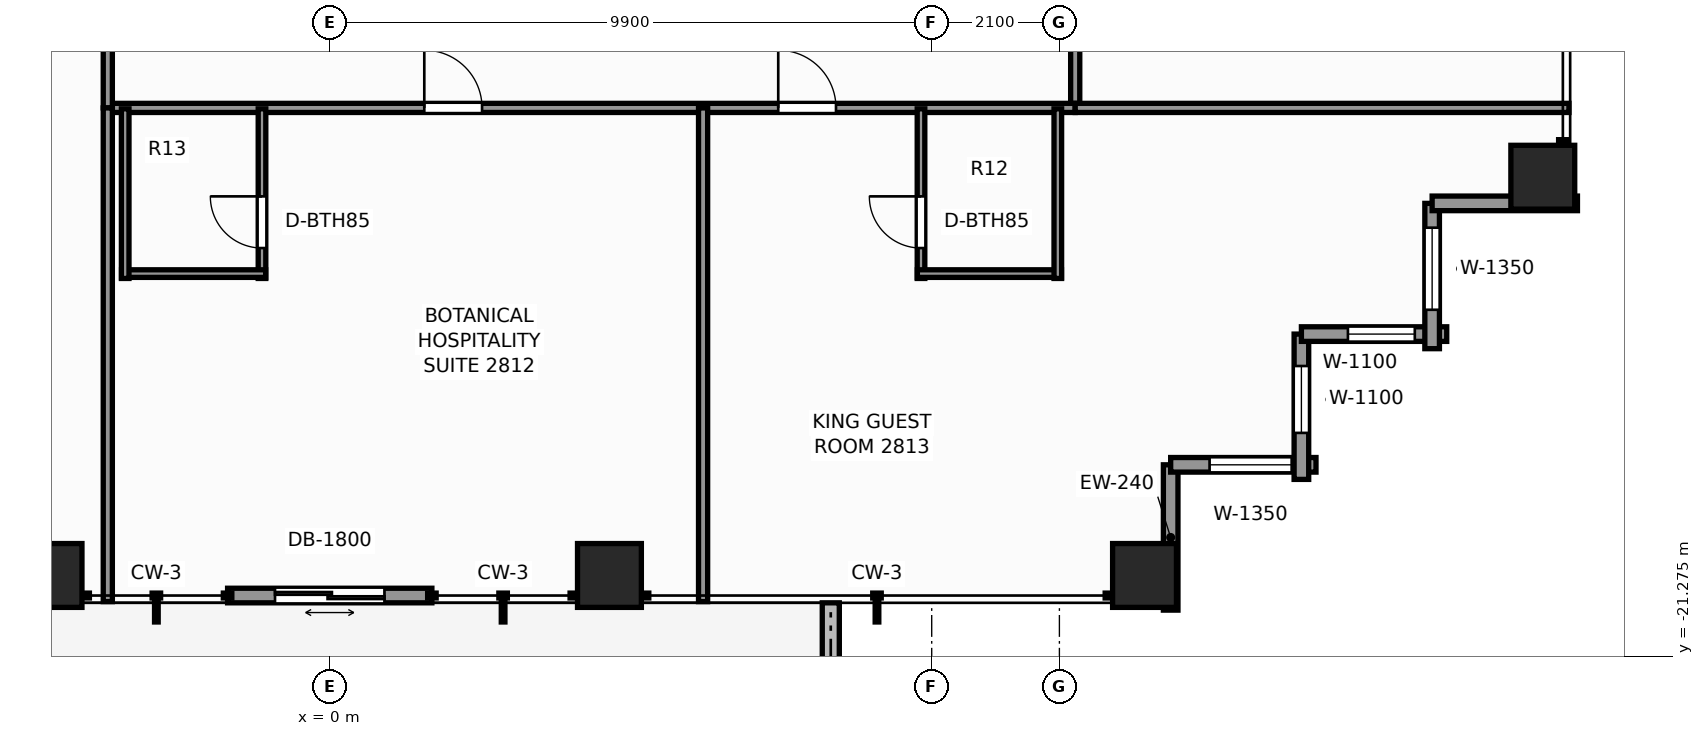
"""IFC4 building model, lengths in metres.
Left out: names, types, materials, properties, quantities, classifications, styles, units other than length and angle.
Written with IfcOpenShell. Run it as: python <this file> out.ifc"""

import sys

from ifc_helpers import new_model, si_unit, direction, frame, frame_2d, origin, origin_2d, place, context, subcontext, project, spatial, rectangle, extrude, element, fill, save


model = new_model("IFC4")
c1 = context("Model", 3, precision=1e-05, world=origin(), true_north=direction((0.0, 1.0)))
c2 = subcontext(c1, "Body", "Model", "MODEL_VIEW")
j1 = project(units=[si_unit("LENGTHUNIT", "METRE"), si_unit("PLANEANGLEUNIT", "RADIAN")], contexts=[c1])
p1 = place(None, origin())
s1 = spatial("IfcSite", under=j1, at=p1, CompositionType="ELEMENT")
p2 = place(p1, origin())
s2 = spatial("IfcBuilding", under=s1, at=p2, CompositionType="ELEMENT")
p3 = place(p2, frame((0.0, 0.0, 98.6)))
s3 = spatial("IfcBuildingStorey", under=s2, at=p3, CompositionType="ELEMENT", Elevation=98.6)
for number, where, z_axis, x_axis in (
    (1, (-4.6, -19.95, 0.0), (0.0, 0.0, 1.0), (1.0, 0.0, 0.0)),
    (2, (4.6, -19.95, 0.0), (0.0, 0.0, 1.0), (1.0, 0.0, 0.0)),
    (3, (13.4, -19.95, 0.0), (0.0, 0.0, 1.0), (1.0, 0.0, 0.0)),
    (4, (19.95, -13.4, 0.0), (0.0, 0.0, 1.0), (1.0, 0.0, 0.0)),
):
    element("IfcColumn", number, at=place(p3, frame(where, z_axis=z_axis, x_axis=x_axis)), inside=s3, PredefinedType="COLUMN", context=c2, shape_type="SweptSolid", body=[
        extrude(rectangle(XDim=1.05, YDim=1.05, at=origin_2d()), origin(), (0.0, 0.0, 1.0), 3.3),
    ])
p4 = place(p3, frame((8.24, -21.866, -0.04), z_axis=(0.0, 0.0, 1.0), x_axis=(0.0, 1.0, 0.0)))
e5 = element("IfcWall", 5, at=p4, inside=s3, PredefinedType="PARAPET", context=c2, shape_type="SweptSolid", body=[
    extrude(rectangle(XDim=1.466, YDim=0.28, at=frame_2d((0.733, 0.0))), origin(), (0.0, 0.0, 1.0), 0.42),
])
p5 = place(p3, frame((1.68, -20.28, 0.0), z_axis=(0.0, 0.0, 1.0), x_axis=(-1.0, 0.0, 0.0)))
e6 = element("IfcWall", 6, at=p5, inside=s3, PredefinedType="STANDARD", context=c2, shape_type="SweptSolid", body=[
    extrude(rectangle(XDim=3.36, YDim=0.24, at=frame_2d((1.68, 0.0))), origin(), (0.0, 0.0, 1.0), 3.08),
])
p6 = place(p5, frame((0.78, 0.0, 0.0)))
e7 = element("IfcOpeningElement", 7, at=p6, cuts=e6, PredefinedType="OPENING", context=c2, shape_type="SweptSolid", body=[
    extrude(rectangle(XDim=1.8, YDim=2.2, at=frame_2d((0.9, 1.1))), frame((0.0, 0.13, 0.0), z_axis=(0.0, -1.0, 0.0), x_axis=(1.0, 0.0, 0.0)), (0.0, 0.0, 1.0), 0.26),
])
p7 = place(p3, frame((13.83, -18.13, 0.0), z_axis=(0.0, 0.0, 1.0), x_axis=(0.0, -1.0, 0.0)))
e8 = element("IfcWall", 8, at=p7, inside=s3, PredefinedType="STANDARD", context=c2, shape_type="SweptSolid", body=[
    extrude(rectangle(XDim=2.39, YDim=0.24, at=frame_2d((1.195, 0.0))), origin(), (0.0, 0.0, 1.0), 2.459),
])
p8 = place(p3, frame((16.22, -18.13, 0.0), z_axis=(0.0, 0.0, 1.0), x_axis=(-1.0, 0.0, 0.0)))
e9 = element("IfcWall", 9, at=p8, inside=s3, PredefinedType="STANDARD", context=c2, shape_type="SweptSolid", body=[
    extrude(rectangle(XDim=2.39, YDim=0.24, at=frame_2d((1.195, 0.0))), origin(), (0.0, 0.0, 1.0), 2.459),
])
p9 = place(p8, frame((0.4, 0.0, 0.65)))
e10 = element("IfcOpeningElement", 10, at=p9, cuts=e9, PredefinedType="OPENING", context=c2, shape_type="SweptSolid", body=[
    extrude(rectangle(XDim=1.35, YDim=1.55, at=frame_2d((0.675, 0.775))), frame((0.0, 0.13, 0.0), z_axis=(0.0, -1.0, 0.0), x_axis=(1.0, 0.0, 0.0)), (0.0, 0.0, 1.0), 0.26),
])
p10 = place(p3, frame((15.98, -15.98, 0.0), z_axis=(0.0, 0.0, 1.0), x_axis=(0.0, -1.0, 0.0)))
e11 = element("IfcWall", 11, at=p10, inside=s3, PredefinedType="STANDARD", context=c2, shape_type="SweptSolid", body=[
    extrude(rectangle(XDim=2.39, YDim=0.24, at=frame_2d((1.195, 0.0))), origin(), (0.0, 0.0, 1.0), 2.459),
])
p11 = place(p10, frame((0.525, 0.0, 0.65)))
e12 = element("IfcOpeningElement", 12, at=p11, cuts=e11, PredefinedType="OPENING", context=c2, shape_type="SweptSolid", body=[
    extrude(rectangle(XDim=1.1, YDim=1.45, at=frame_2d((0.55, 0.725))), frame((0.0, 0.13, 0.0), z_axis=(0.0, -1.0, 0.0), x_axis=(1.0, 0.0, 0.0)), (0.0, 0.0, 1.0), 0.26),
])
p12 = place(p3, frame((18.37, -15.98, 0.0), z_axis=(0.0, 0.0, 1.0), x_axis=(-1.0, 0.0, 0.0)))
e13 = element("IfcWall", 13, at=p12, inside=s3, PredefinedType="STANDARD", context=c2, shape_type="SweptSolid", body=[
    extrude(rectangle(XDim=2.39, YDim=0.24, at=frame_2d((1.195, 0.0))), origin(), (0.0, 0.0, 1.0), 2.459),
])
p13 = place(p12, frame((0.525, 0.0, 0.65)))
e14 = element("IfcOpeningElement", 14, at=p13, cuts=e13, PredefinedType="OPENING", context=c2, shape_type="SweptSolid", body=[
    extrude(rectangle(XDim=1.1, YDim=1.45, at=frame_2d((0.55, 0.725))), frame((0.0, 0.13, 0.0), z_axis=(0.0, -1.0, 0.0), x_axis=(1.0, 0.0, 0.0)), (0.0, 0.0, 1.0), 0.26),
])
p14 = place(p3, frame((18.13, -13.83, 0.0), z_axis=(0.0, 0.0, 1.0), x_axis=(0.0, -1.0, 0.0)))
e15 = element("IfcWall", 15, at=p14, inside=s3, PredefinedType="STANDARD", context=c2, shape_type="SweptSolid", body=[
    extrude(rectangle(XDim=2.39, YDim=0.24, at=frame_2d((1.195, 0.0))), origin(), (0.0, 0.0, 1.0), 2.459),
])
p15 = place(p14, frame((0.4, 0.0, 0.65)))
e16 = element("IfcOpeningElement", 16, at=p15, cuts=e15, PredefinedType="OPENING", context=c2, shape_type="SweptSolid", body=[
    extrude(rectangle(XDim=1.35, YDim=1.55, at=frame_2d((0.675, 0.775))), frame((0.0, 0.13, 0.0), z_axis=(0.0, -1.0, 0.0), x_axis=(1.0, 0.0, 0.0)), (0.0, 0.0, 1.0), 0.26),
])
p16 = place(p3, frame((20.52, -13.83, 0.0), z_axis=(0.0, 0.0, 1.0), x_axis=(-1.0, 0.0, 0.0)))
e17 = element("IfcWall", 17, at=p16, inside=s3, PredefinedType="STANDARD", context=c2, shape_type="SweptSolid", body=[
    extrude(rectangle(XDim=2.39, YDim=0.24, at=frame_2d((1.195, 0.0))), origin(), (0.0, 0.0, 1.0), 2.459),
])
p17 = place(p3, frame((12.26, -12.26, 0.0), z_axis=(0.0, 0.0, 1.0), x_axis=(0.0, 1.0, 0.0)))
e18 = element("IfcWall", 18, at=p17, inside=s3, PredefinedType="PARTITIONING", context=c2, shape_type="SweptSolid", body=[
    extrude(rectangle(XDim=24.84, YDim=0.15, at=frame_2d((12.42, 0.0))), origin(), (0.0, 0.0, 1.0), 2.292),
])
p18 = place(p17, frame((2.944, 0.0, 0.0)))
e19 = element("IfcOpeningElement", 19, at=p18, cuts=e18, PredefinedType="OPENING", context=c2, shape_type="SweptSolid", body=[
    extrude(rectangle(XDim=0.9, YDim=2.06, at=frame_2d((0.45, 1.03))), frame((0.0, 0.085, 0.0), z_axis=(0.0, -1.0, 0.0), x_axis=(1.0, 0.0, 0.0)), (0.0, 0.0, 1.0), 0.17),
])
p19 = place(p17, frame((5.279, 0.0, 0.0)))
e20 = element("IfcOpeningElement", 20, at=p19, cuts=e18, PredefinedType="OPENING", context=c2, shape_type="SweptSolid", body=[
    extrude(rectangle(XDim=0.9, YDim=2.06, at=frame_2d((0.45, 1.03))), frame((0.0, 0.085, 0.0), z_axis=(0.0, -1.0, 0.0), x_axis=(1.0, 0.0, 0.0)), (0.0, 0.0, 1.0), 0.17),
])
p20 = place(p17, frame((10.671, 0.0, 0.0)))
e21 = element("IfcOpeningElement", 21, at=p20, cuts=e18, PredefinedType="OPENING", context=c2, shape_type="SweptSolid", body=[
    extrude(rectangle(XDim=0.95, YDim=2.06, at=frame_2d((0.475, 1.03))), frame((0.0, 0.085, 0.0), z_axis=(0.0, -1.0, 0.0), x_axis=(1.0, 0.0, 0.0)), (0.0, 0.0, 1.0), 0.17),
])
p21 = place(p17, frame((18.186, 0.0, 0.0)))
e22 = element("IfcOpeningElement", 22, at=p21, cuts=e18, PredefinedType="OPENING", context=c2, shape_type="SweptSolid", body=[
    extrude(rectangle(XDim=0.95, YDim=2.06, at=frame_2d((0.475, 1.03))), frame((0.0, 0.085, 0.0), z_axis=(0.0, -1.0, 0.0), x_axis=(1.0, 0.0, 0.0)), (0.0, 0.0, 1.0), 0.17),
])
p22 = place(p17, frame((20.259, 0.0, 0.0)))
e23 = element("IfcOpeningElement", 23, at=p22, cuts=e18, PredefinedType="OPENING", context=c2, shape_type="SweptSolid", body=[
    extrude(rectangle(XDim=0.95, YDim=2.06, at=frame_2d((0.475, 1.03))), frame((0.0, 0.085, 0.0), z_axis=(0.0, -1.0, 0.0), x_axis=(1.0, 0.0, 0.0)), (0.0, 0.0, 1.0), 0.17),
])
p23 = place(p3, frame((-3.65, -12.26, 0.0), z_axis=(0.0, 0.0, 1.0), x_axis=(1.0, 0.0, 0.0)))
e24 = element("IfcWall", 24, at=p23, inside=s3, PredefinedType="PARTITIONING", context=c2, shape_type="SweptSolid", body=[
    extrude(rectangle(XDim=15.91, YDim=0.15, at=frame_2d((7.955, 0.0))), origin(), (0.0, 0.0, 1.0), 2.292),
])
p24 = place(p23, frame((5.205, 0.0, 0.0)))
e25 = element("IfcOpeningElement", 25, at=p24, cuts=e24, PredefinedType="OPENING", context=c2, shape_type="SweptSolid", body=[
    extrude(rectangle(XDim=0.95, YDim=2.06, at=frame_2d((0.475, 1.03))), frame((0.0, 0.085, 0.0), z_axis=(0.0, -1.0, 0.0), x_axis=(1.0, 0.0, 0.0)), (0.0, 0.0, 1.0), 0.17),
])
p25 = place(p23, frame((11.026, 0.0, 0.0)))
e26 = element("IfcOpeningElement", 26, at=p25, cuts=e24, PredefinedType="OPENING", context=c2, shape_type="SweptSolid", body=[
    extrude(rectangle(XDim=0.95, YDim=2.06, at=frame_2d((0.475, 1.03))), frame((0.0, 0.085, 0.0), z_axis=(0.0, -1.0, 0.0), x_axis=(1.0, 0.0, 0.0)), (0.0, 0.0, 1.0), 0.17),
])
p26 = place(p3, frame((-3.65, -12.26, 0.0), z_axis=(0.0, 0.0, 1.0), x_axis=(0.0, 1.0, 0.0)))
e27 = element("IfcWall", 27, at=p26, inside=s3, PredefinedType="PARTITIONING", context=c2, shape_type="SweptSolid", body=[
    extrude(rectangle(XDim=2.36, YDim=0.15, at=frame_2d((1.18, 0.0))), origin(), (0.0, 0.0, 1.0), 3.08),
])
p27 = place(p3, frame((12.26, -12.26, 0.0), z_axis=(0.0, 0.0, 1.0), x_axis=(1.0, 0.0, 0.0)))
e28 = element("IfcWall", 28, at=p27, inside=s3, PredefinedType="PARTITIONING", context=c2, shape_type="SweptSolid", body=[
    extrude(rectangle(XDim=8.12, YDim=0.15, at=frame_2d((4.06, 0.0))), origin(), (0.0, 0.0, 1.0), 2.292),
])
p28 = place(p3, frame((-3.65, -20.38, 0.0), z_axis=(0.0, 0.0, 1.0), x_axis=(0.0, 1.0, 0.0)))
e29 = element("IfcWall", 29, at=p28, inside=s3, PredefinedType="PARTITIONING", context=c2, shape_type="SweptSolid", body=[
    extrude(rectangle(XDim=8.12, YDim=0.15, at=frame_2d((4.06, 0.0))), origin(), (0.0, 0.0, 1.0), 2.449),
])
p29 = place(p3, frame((6.14, -20.38, 0.0), z_axis=(0.0, 0.0, 1.0), x_axis=(0.0, 1.0, 0.0)))
e30 = element("IfcWall", 30, at=p29, inside=s3, PredefinedType="PARTITIONING", context=c2, shape_type="SweptSolid", body=[
    extrude(rectangle(XDim=8.12, YDim=0.15, at=frame_2d((4.06, 0.0))), origin(), (0.0, 0.0, 1.0), 2.369),
])
p30 = place(p3, frame((-1.114, -15.065, 0.0), z_axis=(0.0, 0.0, 1.0), x_axis=(0.0, 1.0, 0.0)))
e31 = element("IfcWall", 31, at=p30, inside=s3, PredefinedType="PARTITIONING", context=c2, shape_type="SweptSolid", body=[
    extrude(rectangle(XDim=2.79, YDim=0.125, at=frame_2d((1.395, 0.0))), origin(), (0.0, 0.0, 1.0), 3.08),
])
p31 = place(p30, frame((0.5, 0.0, 0.0)))
e32 = element("IfcOpeningElement", 32, at=p31, cuts=e31, PredefinedType="OPENING", context=c2, shape_type="SweptSolid", body=[
    extrude(rectangle(XDim=0.85, YDim=2.03, at=frame_2d((0.425, 1.015))), frame((0.0, 0.073, 0.0), z_axis=(0.0, -1.0, 0.0), x_axis=(1.0, 0.0, 0.0)), (0.0, 0.0, 1.0), 0.145),
])
p32 = place(p3, frame((-3.424, -14.985, 0.0), z_axis=(0.0, 0.0, 1.0), x_axis=(1.0, 0.0, 0.0)))
e33 = element("IfcWall", 33, at=p32, inside=s3, PredefinedType="PARTITIONING", context=c2, shape_type="SweptSolid", body=[
    extrude(rectangle(XDim=2.37, YDim=0.125, at=frame_2d((1.185, 0.0))), origin(), (0.0, 0.0, 1.0), 3.08),
])
p33 = place(p3, frame((-3.364, -15.065, 0.0), z_axis=(0.0, 0.0, 1.0), x_axis=(0.0, 1.0, 0.0)))
e34 = element("IfcWall", 34, at=p33, inside=s3, PredefinedType="PARTITIONING", context=c2, shape_type="SweptSolid", body=[
    extrude(rectangle(XDim=2.79, YDim=0.125, at=frame_2d((1.395, 0.0))), origin(), (0.0, 0.0, 1.0), 3.08),
])
p34 = place(p3, frame((9.724, -15.065, 0.0), z_axis=(0.0, 0.0, 1.0), x_axis=(0.0, 1.0, 0.0)))
e35 = element("IfcWall", 35, at=p34, inside=s3, PredefinedType="PARTITIONING", context=c2, shape_type="SweptSolid", body=[
    extrude(rectangle(XDim=2.79, YDim=0.125, at=frame_2d((1.395, 0.0))), origin(), (0.0, 0.0, 1.0), 3.08),
])
p35 = place(p34, frame((0.5, 0.0, 0.0)))
e36 = element("IfcOpeningElement", 36, at=p35, cuts=e35, PredefinedType="OPENING", context=c2, shape_type="SweptSolid", body=[
    extrude(rectangle(XDim=0.85, YDim=2.03, at=frame_2d((0.425, 1.015))), frame((0.0, 0.073, 0.0), z_axis=(0.0, -1.0, 0.0), x_axis=(1.0, 0.0, 0.0)), (0.0, 0.0, 1.0), 0.145),
])
p36 = place(p3, frame((9.664, -14.985, 0.0), z_axis=(0.0, 0.0, 1.0), x_axis=(1.0, 0.0, 0.0)))
e37 = element("IfcWall", 37, at=p36, inside=s3, PredefinedType="PARTITIONING", context=c2, shape_type="SweptSolid", body=[
    extrude(rectangle(XDim=2.37, YDim=0.125, at=frame_2d((1.185, 0.0))), origin(), (0.0, 0.0, 1.0), 2.292),
])
p37 = place(p3, frame((11.974, -15.065, 0.0), z_axis=(0.0, 0.0, 1.0), x_axis=(0.0, 1.0, 0.0)))
e38 = element("IfcWall", 38, at=p37, inside=s3, PredefinedType="PARTITIONING", context=c2, shape_type="SweptSolid", body=[
    extrude(rectangle(XDim=2.79, YDim=0.125, at=frame_2d((1.395, 0.0))), origin(), (0.0, 0.0, 1.0), 3.08),
])
p38 = place(p6, origin())
e39 = element("IfcDoor", 39, at=p38, inside=s3, OperationType="DOUBLE_DOOR_SLIDING", PredefinedType="DOOR", context=c2, shape_type="SweptSolid", body=[
    extrude(rectangle(XDim=1.8, YDim=2.2, at=frame_2d((0.9, 1.1))), frame((0.0, 0.025, 0.0), z_axis=(0.0, -1.0, 0.0), x_axis=(1.0, 0.0, 0.0)), (0.0, 0.0, 1.0), 0.05),
])
fill(e7, e39)
p39 = place(p9, origin())
e40 = element("IfcWindow", 40, at=p39, inside=s3, PartitioningType="SINGLE_PANEL", PredefinedType="WINDOW", context=c2, shape_type="SweptSolid", body=[
    extrude(rectangle(XDim=1.35, YDim=1.55, at=frame_2d((0.675, 0.775))), frame((0.0, 0.03, 0.0), z_axis=(0.0, -1.0, 0.0), x_axis=(1.0, 0.0, 0.0)), (0.0, 0.0, 1.0), 0.06),
])
fill(e10, e40)
p40 = place(p11, origin())
e41 = element("IfcWindow", 41, at=p40, inside=s3, PartitioningType="SINGLE_PANEL", PredefinedType="WINDOW", context=c2, shape_type="SweptSolid", body=[
    extrude(rectangle(XDim=1.1, YDim=1.45, at=frame_2d((0.55, 0.725))), frame((0.0, 0.03, 0.0), z_axis=(0.0, -1.0, 0.0), x_axis=(1.0, 0.0, 0.0)), (0.0, 0.0, 1.0), 0.06),
])
fill(e12, e41)
p41 = place(p13, origin())
e42 = element("IfcWindow", 42, at=p41, inside=s3, PartitioningType="SINGLE_PANEL", PredefinedType="WINDOW", context=c2, shape_type="SweptSolid", body=[
    extrude(rectangle(XDim=1.1, YDim=1.45, at=frame_2d((0.55, 0.725))), frame((0.0, 0.03, 0.0), z_axis=(0.0, -1.0, 0.0), x_axis=(1.0, 0.0, 0.0)), (0.0, 0.0, 1.0), 0.06),
])
fill(e14, e42)
p42 = place(p15, origin())
e43 = element("IfcWindow", 43, at=p42, inside=s3, PartitioningType="SINGLE_PANEL", PredefinedType="WINDOW", context=c2, shape_type="SweptSolid", body=[
    extrude(rectangle(XDim=1.35, YDim=1.55, at=frame_2d((0.675, 0.775))), frame((0.0, 0.03, 0.0), z_axis=(0.0, -1.0, 0.0), x_axis=(1.0, 0.0, 0.0)), (0.0, 0.0, 1.0), 0.06),
])
fill(e16, e43)
p43 = place(p31, origin())
e44 = element("IfcDoor", 44, at=p43, inside=s3, OperationType="SINGLE_SWING_RIGHT", PredefinedType="DOOR", context=c2, shape_type="SweptSolid", body=[
    extrude(rectangle(XDim=0.85, YDim=2.03, at=frame_2d((0.425, 1.015))), frame((0.0, 0.025, 0.0), z_axis=(0.0, -1.0, 0.0), x_axis=(1.0, 0.0, 0.0)), (0.0, 0.0, 1.0), 0.05),
])
fill(e32, e44)
p44 = place(p24, origin())
e45 = element("IfcDoor", 45, at=p44, inside=s3, OperationType="SINGLE_SWING_LEFT", PredefinedType="DOOR", context=c2, shape_type="SweptSolid", body=[
    extrude(rectangle(XDim=0.95, YDim=2.06, at=frame_2d((0.475, 1.03))), frame((0.0, 0.025, 0.0), z_axis=(0.0, -1.0, 0.0), x_axis=(1.0, 0.0, 0.0)), (0.0, 0.0, 1.0), 0.05),
])
fill(e25, e45)
p45 = place(p35, origin())
e46 = element("IfcDoor", 46, at=p45, inside=s3, OperationType="SINGLE_SWING_RIGHT", PredefinedType="DOOR", context=c2, shape_type="SweptSolid", body=[
    extrude(rectangle(XDim=0.85, YDim=2.03, at=frame_2d((0.425, 1.015))), frame((0.0, 0.025, 0.0), z_axis=(0.0, -1.0, 0.0), x_axis=(1.0, 0.0, 0.0)), (0.0, 0.0, 1.0), 0.05),
])
fill(e36, e46)
p46 = place(p25, origin())
e47 = element("IfcDoor", 47, at=p46, inside=s3, OperationType="SINGLE_SWING_LEFT", PredefinedType="DOOR", context=c2, shape_type="SweptSolid", body=[
    extrude(rectangle(XDim=0.95, YDim=2.06, at=frame_2d((0.475, 1.03))), frame((0.0, 0.025, 0.0), z_axis=(0.0, -1.0, 0.0), x_axis=(1.0, 0.0, 0.0)), (0.0, 0.0, 1.0), 0.05),
])
fill(e26, e47)
save(model, sys.argv[1])
